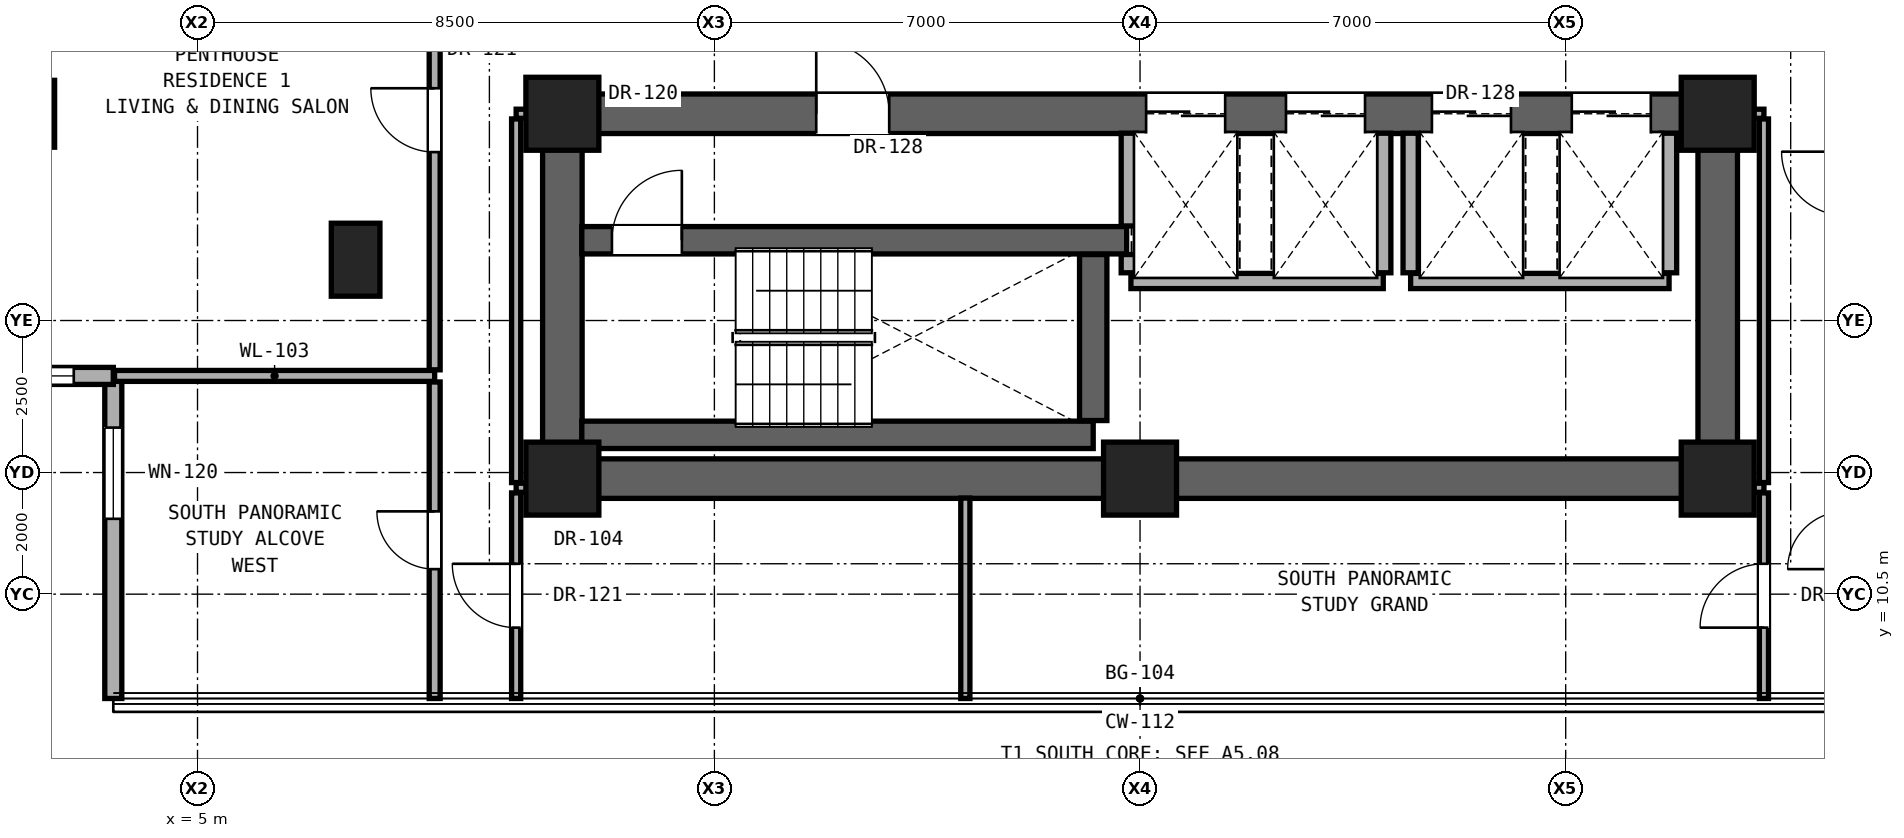
"""IFC4 building model, lengths in metres.
Left out: names, types, materials, properties, quantities, classifications, styles, units other than length and angle.
Written with IfcOpenShell. Run it as: python <this file> out.ifc"""

import sys

from ifc_helpers import new_model, si_unit, direction, frame, frame_2d, origin, origin_2d, place, context, subcontext, project, spatial, rectangle, hollow_rectangle, extrude, element, fill, save


model = new_model("IFC4")
c1 = context("Model", 3, precision=1e-05, world=origin(), true_north=direction((0.0, 1.0)))
c2 = subcontext(c1, "Body", "Model", "MODEL_VIEW")
j1 = project(units=[si_unit("LENGTHUNIT", "METRE"), si_unit("PLANEANGLEUNIT", "RADIAN")], contexts=[c1])
p1 = place(None, origin())
s1 = spatial("IfcSite", under=j1, at=p1, CompositionType="ELEMENT")
p2 = place(p1, origin())
s2 = spatial("IfcBuilding", under=s1, at=p2, CompositionType="ELEMENT")
p3 = place(p2, frame((0.0, 0.0, 111.5)))
s3 = spatial("IfcBuildingStorey", under=s2, at=p3, CompositionType="ELEMENT", Elevation=111.5)
for number, where, z_axis, x_axis in (
    (1, (11.0, 12.4, 0.0), (0.0, 0.0, 1.0), (1.0, 0.0, 0.0)),
    (2, (20.5, 12.4, 0.0), (0.0, 0.0, 1.0), (1.0, 0.0, 0.0)),
    (3, (30.0, 12.4, 0.0), (0.0, 0.0, 1.0), (1.0, 0.0, 0.0)),
    (4, (11.0, 18.4, 0.0), (0.0, 0.0, 1.0), (1.0, 0.0, 0.0)),
    (5, (30.0, 18.4, 0.0), (0.0, 0.0, 1.0), (1.0, 0.0, 0.0)),
):
    element("IfcColumn", number, at=place(p3, frame(where, z_axis=z_axis, x_axis=x_axis)), inside=s3, PredefinedType="COLUMN", context=c2, shape_type="SweptSolid", body=[
        extrude(rectangle(XDim=1.2, YDim=1.2, at=origin_2d()), origin(), (0.0, 0.0, 1.0), 3.3),
    ])
p4 = place(p3, frame((2.1, 18.4, 0.0), z_axis=(0.0, 0.0, 1.0), x_axis=(1.0, 0.0, 0.0)))
e6 = element("IfcColumn", 6, at=p4, inside=s3, PredefinedType="COLUMN", context=c2, shape_type="SweptSolid", body=[
    extrude(hollow_rectangle(XDim=1.1, YDim=1.1, WallThickness=0.06, at=origin_2d()), origin(), (0.0, 0.0, 1.0), 3.3),
])
p5 = place(p3, frame((7.6, 16.0, 0.0), z_axis=(0.0, 0.0, 1.0), x_axis=(1.0, 0.0, 0.0)))
e7 = element("IfcColumn", 7, at=p5, inside=s3, PredefinedType="PILASTER", context=c2, shape_type="SweptSolid", body=[
    extrude(rectangle(XDim=0.8, YDim=1.2, at=origin_2d()), origin(), (0.0, 0.0, 1.0), 3.3),
])
p6 = place(p3, frame((11.0, 12.4, 0.0), z_axis=(0.0, 0.0, 1.0), x_axis=(1.0, 0.0, 0.0)))
e8 = element("IfcWall", 8, at=p6, inside=s3, PredefinedType="SHEAR", context=c2, shape_type="SweptSolid", body=[
    extrude(rectangle(XDim=19.0, YDim=0.65, at=frame_2d((9.5, 0.0))), origin(), (0.0, 0.0, 1.0), 3.08),
])
for number, where, z_axis, x_axis in (
    (9, (11.0, 12.4, 0.0), (0.0, 0.0, 1.0), (0.0, 1.0, 0.0)),
    (10, (30.0, 12.4, 0.0), (0.0, 0.0, 1.0), (0.0, 1.0, 0.0)),
):
    element("IfcWall", number, at=place(p3, frame(where, z_axis=z_axis, x_axis=x_axis)), inside=s3, PredefinedType="SHEAR", context=c2, shape_type="SweptSolid", body=[
        extrude(rectangle(XDim=6.0, YDim=0.65, at=frame_2d((3.0, 0.0))), origin(), (0.0, 0.0, 1.0), 3.08),
    ])
p7 = place(p3, frame((11.0, 18.4, 0.0), z_axis=(0.0, 0.0, 1.0), x_axis=(1.0, 0.0, 0.0)))
e11 = element("IfcWall", 11, at=p7, inside=s3, PredefinedType="SHEAR", context=c2, shape_type="SweptSolid", body=[
    extrude(rectangle(XDim=19.0, YDim=0.65, at=frame_2d((9.5, 0.0))), origin(), (0.0, 0.0, 1.0), 3.08),
])
p8 = place(p7, frame((4.175, 0.0, 0.0)))
e12 = element("IfcOpeningElement", 12, at=p8, cuts=e11, PredefinedType="OPENING", context=c2, shape_type="SweptSolid", body=[
    extrude(rectangle(XDim=1.2, YDim=2.25, at=frame_2d((0.6, 1.125))), frame((0.0, 0.335, 0.0), z_axis=(0.0, -1.0, 0.0), x_axis=(1.0, 0.0, 0.0)), (0.0, 0.0, 1.0), 0.67),
])
p9 = place(p7, frame((9.6, 0.0, 0.0)))
e13 = element("IfcOpeningElement", 13, at=p9, cuts=e11, PredefinedType="OPENING", context=c2, shape_type="SweptSolid", body=[
    extrude(rectangle(XDim=1.3, YDim=2.3, at=frame_2d((0.65, 1.15))), frame((0.0, 0.335, 0.0), z_axis=(0.0, -1.0, 0.0), x_axis=(1.0, 0.0, 0.0)), (0.0, 0.0, 1.0), 0.67),
])
p10 = place(p7, frame((11.9, 0.0, 0.0)))
e14 = element("IfcOpeningElement", 14, at=p10, cuts=e11, PredefinedType="OPENING", context=c2, shape_type="SweptSolid", body=[
    extrude(rectangle(XDim=1.3, YDim=2.3, at=frame_2d((0.65, 1.15))), frame((0.0, 0.335, 0.0), z_axis=(0.0, -1.0, 0.0), x_axis=(1.0, 0.0, 0.0)), (0.0, 0.0, 1.0), 0.67),
])
p11 = place(p7, frame((14.3, 0.0, 0.0)))
e15 = element("IfcOpeningElement", 15, at=p11, cuts=e11, PredefinedType="OPENING", context=c2, shape_type="SweptSolid", body=[
    extrude(rectangle(XDim=1.3, YDim=2.3, at=frame_2d((0.65, 1.15))), frame((0.0, 0.335, 0.0), z_axis=(0.0, -1.0, 0.0), x_axis=(1.0, 0.0, 0.0)), (0.0, 0.0, 1.0), 0.67),
])
p12 = place(p7, frame((16.6, 0.0, 0.0)))
e16 = element("IfcOpeningElement", 16, at=p12, cuts=e11, PredefinedType="OPENING", context=c2, shape_type="SweptSolid", body=[
    extrude(rectangle(XDim=1.3, YDim=2.3, at=frame_2d((0.65, 1.15))), frame((0.0, 0.335, 0.0), z_axis=(0.0, -1.0, 0.0), x_axis=(1.0, 0.0, 0.0)), (0.0, 0.0, 1.0), 0.67),
])
p13 = place(p3, frame((3.615, 14.089, 0.0), z_axis=(0.0, 0.0, 1.0), x_axis=(0.0, -1.0, 0.0)))
e17 = element("IfcWall", 17, at=p13, inside=s3, PredefinedType="SOLIDWALL", context=c2, shape_type="SweptSolid", body=[
    extrude(rectangle(XDim=5.305, YDim=0.28, at=frame_2d((2.653, 0.0))), origin(), (0.0, 0.0, 1.0), 3.06),
])
p14 = place(p13, frame((0.85, 0.0, 0.81)))
e18 = element("IfcOpeningElement", 18, at=p14, cuts=e17, PredefinedType="OPENING", context=c2, shape_type="SweptSolid", body=[
    extrude(rectangle(XDim=1.5, YDim=2.1, at=frame_2d((0.75, 1.05))), frame((0.0, 0.15, 0.0), z_axis=(0.0, -1.0, 0.0), x_axis=(1.0, 0.0, 0.0)), (0.0, 0.0, 1.0), 0.3),
])
p15 = place(p3, frame((-1.69, 14.089, 0.0), z_axis=(0.0, 0.0, 1.0), x_axis=(1.0, 0.0, 0.0)))
e19 = element("IfcWall", 19, at=p15, inside=s3, PredefinedType="SOLIDWALL", context=c2, shape_type="SweptSolid", body=[
    extrude(rectangle(XDim=5.305, YDim=0.28, at=frame_2d((2.652, 0.0))), origin(), (0.0, 0.0, 1.0), 3.06),
])
p16 = place(p15, frame((3.555, 0.0, 0.85)))
e20 = element("IfcOpeningElement", 20, at=p16, cuts=e19, PredefinedType="OPENING", context=c2, shape_type="SweptSolid", body=[
    extrude(rectangle(XDim=1.1, YDim=2.0, at=frame_2d((0.55, 1.0))), frame((0.0, 0.15, 0.0), z_axis=(0.0, -1.0, 0.0), x_axis=(1.0, 0.0, 0.0)), (0.0, 0.0, 1.0), 0.3),
])
for number, where, z_axis, x_axis in (
    (21, (10.24, 12.25, 0.0), (0.0, 0.0, 1.0), (1.0, 0.0, 0.0)),
    (22, (30.32, 12.25, 0.0), (0.0, 0.0, 1.0), (1.0, 0.0, 0.0)),
):
    element("IfcWall", number, at=place(p3, frame(where, z_axis=z_axis, x_axis=x_axis)), inside=s3, PredefinedType="PARTITIONING", context=c2, shape_type="SweptSolid", body=[
        extrude(rectangle(XDim=0.44, YDim=0.15, at=frame_2d((0.22, 0.0))), origin(), (0.0, 0.0, 1.0), 3.08),
    ])
p17 = place(p3, frame((11.32, 13.12, 0.0), z_axis=(0.0, 0.0, 1.0), x_axis=(1.0, 0.0, 0.0)))
e23 = element("IfcWall", 23, at=p17, inside=s3, PredefinedType="SHEAR", context=c2, shape_type="SweptSolid", body=[
    extrude(rectangle(XDim=8.41, YDim=0.45, at=frame_2d((4.205, 0.0))), origin(), (0.0, 0.0, 1.0), 3.08),
])
p18 = place(p3, frame((3.635, 14.089, 0.0), z_axis=(0.0, 0.0, 1.0), x_axis=(1.0, 0.0, 0.0)))
e24 = element("IfcWall", 24, at=p18, inside=s3, PredefinedType="PARTITIONING", context=c2, shape_type="SweptSolid", body=[
    extrude(rectangle(XDim=5.265, YDim=0.18, at=frame_2d((2.632, 0.0))), origin(), (0.0, 0.0, 1.0), 3.08),
])
p19 = place(p3, frame((20.35, 15.65, 0.0), z_axis=(0.0, 0.0, 1.0), x_axis=(1.0, 0.0, 0.0)))
e25 = element("IfcWall", 25, at=p19, inside=s3, PredefinedType="SOLIDWALL", context=c2, shape_type="SweptSolid", body=[
    extrude(rectangle(XDim=4.15, YDim=0.25, at=frame_2d((2.075, 0.0))), origin(), (0.0, 0.0, 1.0), 3.08),
])
p20 = place(p3, frame((24.95, 15.65, 0.0), z_axis=(0.0, 0.0, 1.0), x_axis=(1.0, 0.0, 0.0)))
e26 = element("IfcWall", 26, at=p20, inside=s3, PredefinedType="SOLIDWALL", context=c2, shape_type="SweptSolid", body=[
    extrude(rectangle(XDim=4.25, YDim=0.25, at=frame_2d((2.125, 0.0))), origin(), (0.0, 0.0, 1.0), 3.08),
])
p21 = place(p3, frame((11.32, 16.32, 0.0), z_axis=(0.0, 0.0, 1.0), x_axis=(1.0, 0.0, 0.0)))
e27 = element("IfcWall", 27, at=p21, inside=s3, PredefinedType="SHEAR", context=c2, shape_type="SweptSolid", body=[
    extrude(rectangle(XDim=8.96, YDim=0.45, at=frame_2d((4.48, 0.0))), origin(), (0.0, 0.0, 1.0), 3.08),
])
p22 = place(p21, frame((0.495, 0.0, 0.0)))
e28 = element("IfcOpeningElement", 28, at=p22, cuts=e27, PredefinedType="OPENING", context=c2, shape_type="SweptSolid", body=[
    extrude(rectangle(XDim=1.15, YDim=2.2, at=frame_2d((0.575, 1.1))), frame((0.0, 0.235, 0.0), z_axis=(0.0, -1.0, 0.0), x_axis=(1.0, 0.0, 0.0)), (0.0, 0.0, 1.0), 0.47),
])
for number, where, z_axis, x_axis in (
    (29, (10.24, 18.4, 0.0), (0.0, 0.0, 1.0), (1.0, 0.0, 0.0)),
    (30, (30.32, 18.4, 0.0), (0.0, 0.0, 1.0), (1.0, 0.0, 0.0)),
):
    element("IfcWall", number, at=place(p3, frame(where, z_axis=z_axis, x_axis=x_axis)), inside=s3, PredefinedType="PARTITIONING", context=c2, shape_type="SweptSolid", body=[
        extrude(rectangle(XDim=0.44, YDim=0.15, at=frame_2d((0.22, 0.0))), origin(), (0.0, 0.0, 1.0), 2.456),
    ])
p23 = place(p3, frame((8.9, 8.784, 0.0), z_axis=(0.0, 0.0, 1.0), x_axis=(0.0, 1.0, 0.0)))
e31 = element("IfcWall", 31, at=p23, inside=s3, PredefinedType="PARTITIONING", context=c2, shape_type="SweptSolid", body=[
    extrude(rectangle(XDim=5.205, YDim=0.18, at=frame_2d((2.603, 0.0))), origin(), (0.0, 0.0, 1.0), 3.08),
])
p24 = place(p23, frame((2.127, 0.0, 0.0)))
e32 = element("IfcOpeningElement", 32, at=p24, cuts=e31, PredefinedType="OPENING", context=c2, shape_type="SweptSolid", body=[
    extrude(rectangle(XDim=0.95, YDim=2.15, at=frame_2d((0.475, 1.075))), frame((0.0, 0.1, 0.0), z_axis=(0.0, -1.0, 0.0), x_axis=(1.0, 0.0, 0.0)), (0.0, 0.0, 1.0), 0.2),
])
p25 = place(p3, frame((8.9, 14.189, 0.0), z_axis=(0.0, 0.0, 1.0), x_axis=(0.0, 1.0, 0.0)))
e33 = element("IfcWall", 33, at=p25, inside=s3, PredefinedType="PARTITIONING", context=c2, shape_type="SweptSolid", body=[
    extrude(rectangle(XDim=8.211, YDim=0.18, at=frame_2d((4.105, 0.0))), origin(), (0.0, 0.0, 1.0), 2.456),
])
p26 = place(p25, frame((3.581, 0.0, 0.0)))
e34 = element("IfcOpeningElement", 34, at=p26, cuts=e33, PredefinedType="OPENING", context=c2, shape_type="SweptSolid", body=[
    extrude(rectangle(XDim=1.05, YDim=2.2, at=frame_2d((0.525, 1.1))), frame((0.0, 0.1, 0.0), z_axis=(0.0, -1.0, 0.0), x_axis=(1.0, 0.0, 0.0)), (0.0, 0.0, 1.0), 0.2),
])
p27 = place(p3, frame((10.24, 8.784, 0.0), z_axis=(0.0, 0.0, 1.0), x_axis=(0.0, 1.0, 0.0)))
e35 = element("IfcWall", 35, at=p27, inside=s3, PredefinedType="PARTITIONING", context=c2, shape_type="SweptSolid", body=[
    extrude(rectangle(XDim=3.381, YDim=0.15, at=frame_2d((1.69, 0.0))), origin(), (0.0, 0.0, 1.0), 3.08),
])
p28 = place(p27, frame((1.166, 0.0, 0.0)))
e36 = element("IfcOpeningElement", 36, at=p28, cuts=e35, PredefinedType="OPENING", context=c2, shape_type="SweptSolid", body=[
    extrude(rectangle(XDim=1.05, YDim=2.2, at=frame_2d((0.525, 1.1))), frame((0.0, 0.085, 0.0), z_axis=(0.0, -1.0, 0.0), x_axis=(1.0, 0.0, 0.0)), (0.0, 0.0, 1.0), 0.17),
])
p29 = place(p3, frame((10.24, 12.335, 0.0), z_axis=(0.0, 0.0, 1.0), x_axis=(0.0, 1.0, 0.0)))
e37 = element("IfcWall", 37, at=p29, inside=s3, PredefinedType="PARTITIONING", context=c2, shape_type="SweptSolid", body=[
    extrude(rectangle(XDim=5.98, YDim=0.15, at=frame_2d((2.99, 0.0))), origin(), (0.0, 0.0, 1.0), 2.456),
])
p30 = place(p3, frame((17.627, 8.784, 0.0), z_axis=(0.0, 0.0, 1.0), x_axis=(0.0, 1.0, 0.0)))
e38 = element("IfcWall", 38, at=p30, inside=s3, PredefinedType="PARTITIONING", context=c2, shape_type="SweptSolid", body=[
    extrude(rectangle(XDim=3.296, YDim=0.15, at=frame_2d((1.648, 0.0))), origin(), (0.0, 0.0, 1.0), 3.08),
])
p31 = place(p3, frame((19.73, 13.355, 0.0), z_axis=(0.0, 0.0, 1.0), x_axis=(0.0, 1.0, 0.0)))
e39 = element("IfcWall", 39, at=p31, inside=s3, PredefinedType="SHEAR", context=c2, shape_type="SweptSolid", body=[
    extrude(rectangle(XDim=2.73, YDim=0.45, at=frame_2d((1.365, 0.0))), origin(), (0.0, 0.0, 1.0), 3.08),
])
p32 = place(p3, frame((20.315, 15.785, 0.0), z_axis=(0.0, 0.0, 1.0), x_axis=(0.0, 1.0, 0.0)))
e40 = element("IfcWall", 40, at=p32, inside=s3, PredefinedType="SOLIDWALL", context=c2, shape_type="SweptSolid", body=[
    extrude(rectangle(XDim=0.3, YDim=0.25, at=frame_2d((0.15, 0.0))), origin(), (0.0, 0.0, 1.0), 3.08),
])
p33 = place(p3, frame((20.315, 16.555, 0.0), z_axis=(0.0, 0.0, 1.0), x_axis=(0.0, 1.0, 0.0)))
e41 = element("IfcWall", 41, at=p33, inside=s3, PredefinedType="SOLIDWALL", context=c2, shape_type="SweptSolid", body=[
    extrude(rectangle(XDim=1.525, YDim=0.25, at=frame_2d((0.763, 0.0))), origin(), (0.0, 0.0, 1.0), 3.08),
])
for number, where, z_axis, x_axis in (
    (42, (24.5, 15.785, 0.0), (0.0, 0.0, 1.0), (0.0, 1.0, 0.0)),
    (43, (24.95, 15.785, 0.0), (0.0, 0.0, 1.0), (0.0, 1.0, 0.0)),
    (44, (29.2, 15.785, 0.0), (0.0, 0.0, 1.0), (0.0, 1.0, 0.0)),
):
    element("IfcWall", number, at=place(p3, frame(where, z_axis=z_axis, x_axis=x_axis)), inside=s3, PredefinedType="SOLIDWALL", context=c2, shape_type="SweptSolid", body=[
        extrude(rectangle(XDim=2.295, YDim=0.25, at=frame_2d((1.147, 0.0))), origin(), (0.0, 0.0, 1.0), 3.08),
    ])
p34 = place(p3, frame((30.76, 8.784, 0.0), z_axis=(0.0, 0.0, 1.0), x_axis=(0.0, 1.0, 0.0)))
e45 = element("IfcWall", 45, at=p34, inside=s3, PredefinedType="PARTITIONING", context=c2, shape_type="SweptSolid", body=[
    extrude(rectangle(XDim=3.381, YDim=0.15, at=frame_2d((1.69, 0.0))), origin(), (0.0, 0.0, 1.0), 3.08),
])
p35 = place(p34, frame((1.166, 0.0, 0.0)))
e46 = element("IfcOpeningElement", 46, at=p35, cuts=e45, PredefinedType="OPENING", context=c2, shape_type="SweptSolid", body=[
    extrude(rectangle(XDim=1.05, YDim=2.2, at=frame_2d((0.525, 1.1))), frame((0.0, 0.085, 0.0), z_axis=(0.0, -1.0, 0.0), x_axis=(1.0, 0.0, 0.0)), (0.0, 0.0, 1.0), 0.17),
])
p36 = place(p3, frame((30.76, 12.335, 0.0), z_axis=(0.0, 0.0, 1.0), x_axis=(0.0, 1.0, 0.0)))
e47 = element("IfcWall", 47, at=p36, inside=s3, PredefinedType="PARTITIONING", context=c2, shape_type="SweptSolid", body=[
    extrude(rectangle(XDim=5.98, YDim=0.15, at=frame_2d((2.99, 0.0))), origin(), (0.0, 0.0, 1.0), 2.456),
])
p37 = place(p14, origin())
e48 = element("IfcWindow", 48, at=p37, inside=s3, PartitioningType="SINGLE_PANEL", PredefinedType="WINDOW", context=c2, shape_type="SweptSolid", body=[
    extrude(rectangle(XDim=1.5, YDim=2.1, at=frame_2d((0.75, 1.05))), frame((0.0, 0.03, 0.0), z_axis=(0.0, -1.0, 0.0), x_axis=(1.0, 0.0, 0.0)), (0.0, 0.0, 1.0), 0.06),
])
fill(e18, e48)
p38 = place(p16, origin())
e49 = element("IfcWindow", 49, at=p38, inside=s3, PartitioningType="SINGLE_PANEL", PredefinedType="WINDOW", context=c2, shape_type="SweptSolid", body=[
    extrude(rectangle(XDim=1.1, YDim=2.0, at=frame_2d((0.55, 1.0))), frame((0.0, 0.03, 0.0), z_axis=(0.0, -1.0, 0.0), x_axis=(1.0, 0.0, 0.0)), (0.0, 0.0, 1.0), 0.06),
])
fill(e20, e49)
p39 = place(p8, origin())
e50 = element("IfcDoor", 50, at=p39, inside=s3, OperationType="SINGLE_SWING_LEFT", PredefinedType="DOOR", context=c2, shape_type="SweptSolid", body=[
    extrude(rectangle(XDim=1.2, YDim=2.25, at=frame_2d((0.6, 1.125))), frame((0.0, 0.025, 0.0), z_axis=(0.0, -1.0, 0.0), x_axis=(1.0, 0.0, 0.0)), (0.0, 0.0, 1.0), 0.05),
])
fill(e12, e50)
p40 = place(p22, origin())
e51 = element("IfcDoor", 51, at=p40, inside=s3, OperationType="SINGLE_SWING_RIGHT", PredefinedType="DOOR", context=c2, shape_type="SweptSolid", body=[
    extrude(rectangle(XDim=1.15, YDim=2.2, at=frame_2d((0.575, 1.1))), frame((0.0, 0.025, 0.0), z_axis=(0.0, -1.0, 0.0), x_axis=(1.0, 0.0, 0.0)), (0.0, 0.0, 1.0), 0.05),
])
fill(e28, e51)
p41 = place(p26, origin())
e52 = element("IfcDoor", 52, at=p41, inside=s3, OperationType="SINGLE_SWING_RIGHT", PredefinedType="DOOR", context=c2, shape_type="SweptSolid", body=[
    extrude(rectangle(XDim=1.05, YDim=2.2, at=frame_2d((0.525, 1.1))), frame((0.0, 0.025, 0.0), z_axis=(0.0, -1.0, 0.0), x_axis=(1.0, 0.0, 0.0)), (0.0, 0.0, 1.0), 0.05),
])
fill(e34, e52)
p42 = place(p28, origin())
e53 = element("IfcDoor", 53, at=p42, inside=s3, OperationType="SINGLE_SWING_RIGHT", PredefinedType="DOOR", context=c2, shape_type="SweptSolid", body=[
    extrude(rectangle(XDim=1.05, YDim=2.2, at=frame_2d((0.525, 1.1))), frame((0.0, 0.025, 0.0), z_axis=(0.0, -1.0, 0.0), x_axis=(1.0, 0.0, 0.0)), (0.0, 0.0, 1.0), 0.05),
])
fill(e36, e53)
p43 = place(p35, origin())
e54 = element("IfcDoor", 54, at=p43, inside=s3, OperationType="SINGLE_SWING_LEFT", PredefinedType="DOOR", context=c2, shape_type="SweptSolid", body=[
    extrude(rectangle(XDim=1.05, YDim=2.2, at=frame_2d((0.525, 1.1))), frame((0.0, 0.025, 0.0), z_axis=(0.0, -1.0, 0.0), x_axis=(1.0, 0.0, 0.0)), (0.0, 0.0, 1.0), 0.05),
])
fill(e46, e54)
p44 = place(p24, origin())
e55 = element("IfcDoor", 55, at=p44, inside=s3, OperationType="SINGLE_SWING_RIGHT", PredefinedType="DOOR", context=c2, shape_type="SweptSolid", body=[
    extrude(rectangle(XDim=0.95, YDim=2.15, at=frame_2d((0.475, 1.075))), frame((0.0, 0.025, 0.0), z_axis=(0.0, -1.0, 0.0), x_axis=(1.0, 0.0, 0.0)), (0.0, 0.0, 1.0), 0.05),
])
fill(e32, e55)
p45 = place(p9, origin())
e56 = element("IfcDoor", 56, at=p45, inside=s3, OperationType="DOUBLE_DOOR_SLIDING", PredefinedType="DOOR", context=c2, shape_type="SweptSolid", body=[
    extrude(rectangle(XDim=1.3, YDim=2.3, at=frame_2d((0.65, 1.15))), frame((0.0, 0.025, 0.0), z_axis=(0.0, -1.0, 0.0), x_axis=(1.0, 0.0, 0.0)), (0.0, 0.0, 1.0), 0.05),
])
fill(e13, e56)
p46 = place(p10, origin())
e57 = element("IfcDoor", 57, at=p46, inside=s3, OperationType="DOUBLE_DOOR_SLIDING", PredefinedType="DOOR", context=c2, shape_type="SweptSolid", body=[
    extrude(rectangle(XDim=1.3, YDim=2.3, at=frame_2d((0.65, 1.15))), frame((0.0, 0.025, 0.0), z_axis=(0.0, -1.0, 0.0), x_axis=(1.0, 0.0, 0.0)), (0.0, 0.0, 1.0), 0.05),
])
fill(e14, e57)
p47 = place(p11, origin())
e58 = element("IfcDoor", 58, at=p47, inside=s3, OperationType="DOUBLE_DOOR_SLIDING", PredefinedType="DOOR", context=c2, shape_type="SweptSolid", body=[
    extrude(rectangle(XDim=1.3, YDim=2.3, at=frame_2d((0.65, 1.15))), frame((0.0, 0.025, 0.0), z_axis=(0.0, -1.0, 0.0), x_axis=(1.0, 0.0, 0.0)), (0.0, 0.0, 1.0), 0.05),
])
fill(e15, e58)
p48 = place(p12, origin())
e59 = element("IfcDoor", 59, at=p48, inside=s3, OperationType="DOUBLE_DOOR_SLIDING", PredefinedType="DOOR", context=c2, shape_type="SweptSolid", body=[
    extrude(rectangle(XDim=1.3, YDim=2.3, at=frame_2d((0.65, 1.15))), frame((0.0, 0.025, 0.0), z_axis=(0.0, -1.0, 0.0), x_axis=(1.0, 0.0, 0.0)), (0.0, 0.0, 1.0), 0.05),
])
fill(e16, e59)
save(model, sys.argv[1])
